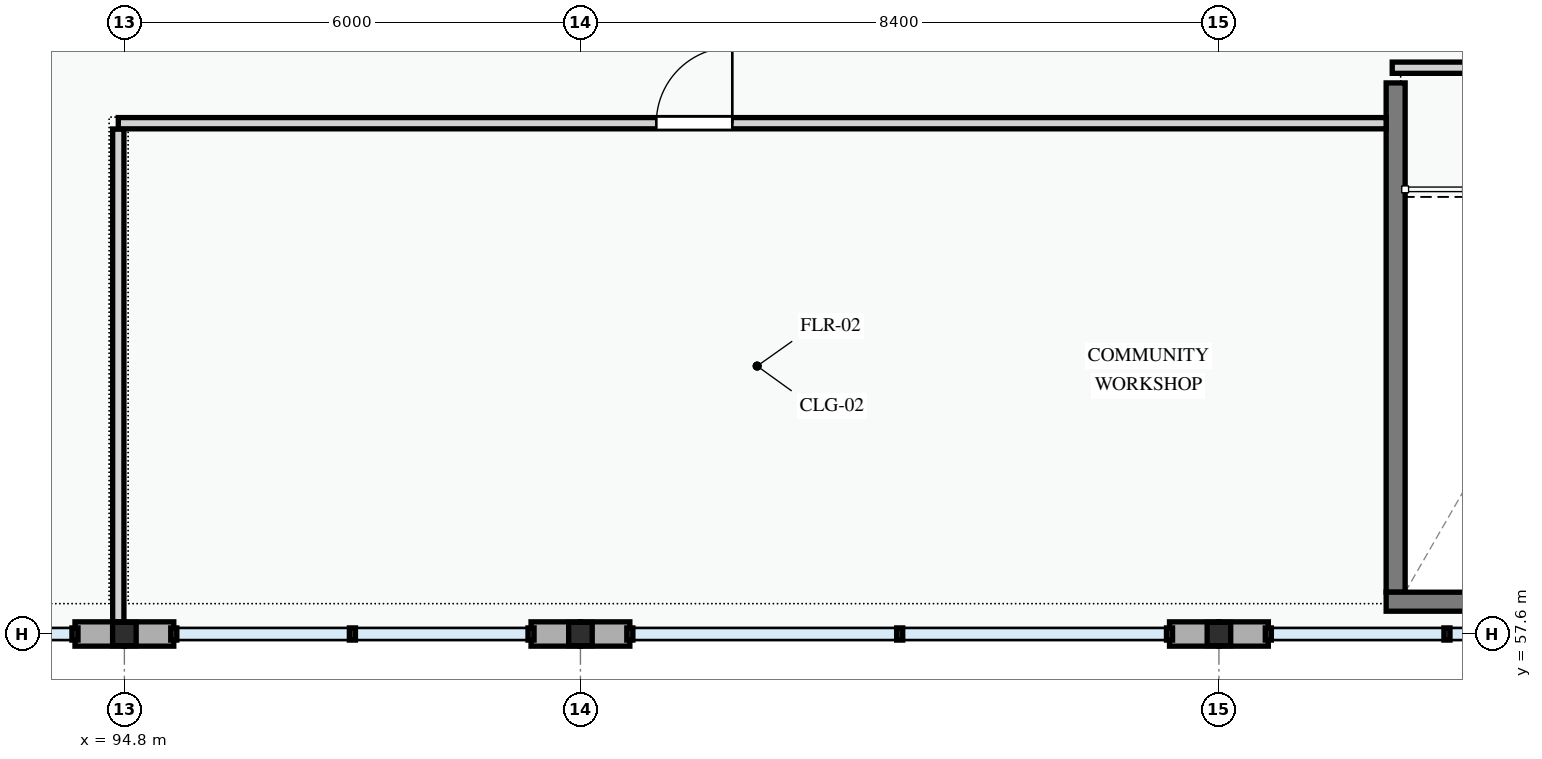
"""IFC4 building model, lengths in metres.
Left out: names, types, materials, properties, quantities, classifications, styles, units other than length and angle.
Written with IfcOpenShell. Run it as: python <this file> out.ifc"""

import sys

from ifc_helpers import new_model, si_unit, direction, frame, frame_2d, origin, origin_2d, place, context, subcontext, project, spatial, rectangle, i_section, extrude, element, fill, save


model = new_model("IFC4")
c1 = context("Model", 3, precision=1e-05, world=origin(), true_north=direction((0.0, 1.0)))
c2 = subcontext(c1, "Body", "Model", "MODEL_VIEW")
j1 = project(units=[si_unit("LENGTHUNIT", "METRE"), si_unit("PLANEANGLEUNIT", "RADIAN")], contexts=[c1])
p1 = place(None, origin())
s1 = spatial("IfcSite", under=j1, at=p1, CompositionType="ELEMENT")
p2 = place(p1, origin())
s2 = spatial("IfcBuilding", under=s1, at=p2, CompositionType="ELEMENT")
p3 = place(p2, frame((0.0, 0.0, 4.5)))
s3 = spatial("IfcBuildingStorey", under=s2, at=p3, CompositionType="ELEMENT", Elevation=4.5)
for number, where, z_axis, x_axis in (
    (1, (94.8, 57.6, 0.0), (0.0, 0.0, 1.0), (1.0, 0.0, 0.0)),
    (2, (100.8, 57.6, 0.0), (0.0, 0.0, 1.0), (1.0, 0.0, 0.0)),
    (3, (109.2, 57.6, 0.0), (0.0, 0.0, 1.0), (1.0, 0.0, 0.0)),
):
    element("IfcColumn", number, at=place(p3, frame(where, z_axis=z_axis, x_axis=x_axis)), inside=s3, PredefinedType="COLUMN", context=c2, shape_type="SweptSolid", body=[
        extrude(i_section(OverallWidth=0.31, OverallDepth=0.308, WebThickness=0.015, FlangeThickness=0.015, FilletRadius=0.012, at=origin_2d()), origin(), (0.0, 0.0, 1.0), 3.6),
    ])
p4 = place(p3, frame((94.15, 57.6, 0.0), z_axis=(0.0, 0.0, 1.0), x_axis=(1.0, 0.0, 0.0)))
e4 = element("IfcWall", 4, at=p4, inside=s3, PredefinedType="STANDARD", context=c2, shape_type="SweptSolid", body=[
    extrude(rectangle(XDim=0.65, YDim=0.32, at=frame_2d((0.325, 0.0))), origin(), (0.0, 0.0, 1.0), 2.786),
])
p5 = place(p3, frame((94.8, 57.6, 0.0), z_axis=(0.0, 0.0, 1.0), x_axis=(1.0, 0.0, 0.0)))
e5 = element("IfcWall", 5, at=p5, inside=s3, PredefinedType="STANDARD", context=c2, shape_type="SweptSolid", body=[
    extrude(rectangle(XDim=0.65, YDim=0.32, at=frame_2d((0.325, 0.0))), origin(), (0.0, 0.0, 1.0), 2.862),
])
p6 = place(p3, frame((100.15, 57.6, 0.0), z_axis=(0.0, 0.0, 1.0), x_axis=(1.0, 0.0, 0.0)))
e6 = element("IfcWall", 6, at=p6, inside=s3, PredefinedType="STANDARD", context=c2, shape_type="SweptSolid", body=[
    extrude(rectangle(XDim=0.65, YDim=0.32, at=frame_2d((0.325, 0.0))), origin(), (0.0, 0.0, 1.0), 2.862),
])
for number, where, z_axis, x_axis in (
    (7, (100.8, 57.6, 0.0), (0.0, 0.0, 1.0), (1.0, 0.0, 0.0)),
    (8, (108.55, 57.6, 0.0), (0.0, 0.0, 1.0), (1.0, 0.0, 0.0)),
):
    element("IfcWall", number, at=place(p3, frame(where, z_axis=z_axis, x_axis=x_axis)), inside=s3, PredefinedType="STANDARD", context=c2, shape_type="SweptSolid", body=[
        extrude(rectangle(XDim=0.65, YDim=0.32, at=frame_2d((0.325, 0.0))), origin(), (0.0, 0.0, 1.0), 2.786),
    ])
p7 = place(p3, frame((109.2, 57.6, 0.0), z_axis=(0.0, 0.0, 1.0), x_axis=(1.0, 0.0, 0.0)))
e9 = element("IfcWall", 9, at=p7, inside=s3, PredefinedType="STANDARD", context=c2, shape_type="SweptSolid", body=[
    extrude(rectangle(XDim=0.65, YDim=0.32, at=frame_2d((0.325, 0.0))), origin(), (0.0, 0.0, 1.0), 2.862),
])
p8 = place(p3, frame((111.525, 64.85, 0.0), z_axis=(0.0, 0.0, 1.0), x_axis=(0.0, -1.0, 0.0)))
e10 = element("IfcWall", 10, at=p8, inside=s3, PredefinedType="SHEAR", context=c2, shape_type="SweptSolid", body=[
    extrude(rectangle(XDim=6.7, YDim=0.25, at=frame_2d((3.35, 0.0))), origin(), (0.0, 0.0, 1.0), 3.3),
])
p9 = place(p3, frame((111.4, 58.025, 0.0), z_axis=(0.0, 0.0, 1.0), x_axis=(1.0, 0.0, 0.0)))
e11 = element("IfcWall", 11, at=p9, inside=s3, PredefinedType="SHEAR", context=c2, shape_type="SweptSolid", body=[
    extrude(rectangle(XDim=3.5, YDim=0.25, at=frame_2d((1.75, 0.0))), origin(), (0.0, 0.0, 1.0), 3.3),
])
p10 = place(p3, frame((94.72, 57.762, 0.0), z_axis=(0.0, 0.0, 1.0), x_axis=(0.0, 1.0, 0.0)))
e12 = element("IfcWall", 12, at=p10, inside=s3, PredefinedType="PARTITIONING", context=c2, shape_type="SweptSolid", body=[
    extrude(rectangle(XDim=6.482, YDim=0.148, at=frame_2d((3.241, 0.0))), origin(), (0.0, 0.0, 1.0), 2.79),
])
p11 = place(p3, frame((94.72, 64.32, 0.0), z_axis=(0.0, 0.0, 1.0), x_axis=(1.0, 0.0, 0.0)))
e13 = element("IfcWall", 13, at=p11, inside=s3, PredefinedType="PARTITIONING", context=c2, shape_type="SweptSolid", body=[
    extrude(rectangle(XDim=16.68, YDim=0.148, at=frame_2d((8.34, 0.0))), origin(), (0.0, 0.0, 1.0), 3.3),
])
p12 = place(p11, frame((7.078, 0.0, 0.0)))
e14 = element("IfcOpeningElement", 14, at=p12, cuts=e13, PredefinedType="OPENING", context=c2, shape_type="SweptSolid", body=[
    extrude(rectangle(XDim=1.0, YDim=2.15, at=frame_2d((0.5, 1.075))), frame((0.0, 0.084, 0.0), z_axis=(0.0, -1.0, 0.0), x_axis=(1.0, 0.0, 0.0)), (0.0, 0.0, 1.0), 0.168),
])
p13 = place(p3, frame((111.48, 65.05, 0.0), z_axis=(0.0, 0.0, 1.0), x_axis=(1.0, 0.0, 0.0)))
e15 = element("IfcWall", 15, at=p13, inside=s3, PredefinedType="PARTITIONING", context=c2, shape_type="SweptSolid", body=[
    extrude(rectangle(XDim=3.58, YDim=0.148, at=frame_2d((1.79, 0.0))), origin(), (0.0, 0.0, 1.0), 3.3),
])
p14 = place(p13, frame((1.25, 0.0, 0.0)))
e16 = element("IfcOpeningElement", 16, at=p14, cuts=e15, PredefinedType="OPENING", context=c2, shape_type="SweptSolid", body=[
    extrude(rectangle(XDim=0.95, YDim=2.1, at=frame_2d((0.475, 1.05))), frame((0.0, 0.084, 0.0), z_axis=(0.0, -1.0, 0.0), x_axis=(1.0, 0.0, 0.0)), (0.0, 0.0, 1.0), 0.168),
])
p15 = place(p12, origin())
e17 = element("IfcDoor", 17, at=p15, inside=s3, OperationType="SINGLE_SWING_RIGHT", PredefinedType="DOOR", context=c2, shape_type="SweptSolid", body=[
    extrude(rectangle(XDim=1.0, YDim=2.15, at=frame_2d((0.5, 1.075))), frame((0.0, 0.025, 0.0), z_axis=(0.0, -1.0, 0.0), x_axis=(1.0, 0.0, 0.0)), (0.0, 0.0, 1.0), 0.05),
])
fill(e14, e17)
save(model, sys.argv[1])
